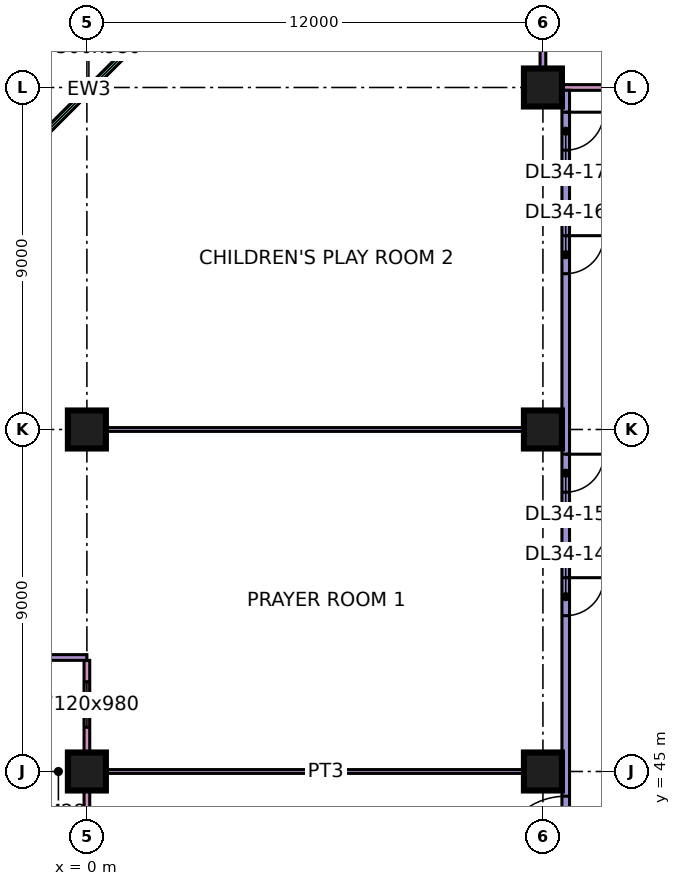
"""IFC4 building model, lengths in metres.
Left out: names, types, materials, properties, quantities, classifications, styles, units other than length and angle.
Written with IfcOpenShell. Run it as: python <this file> out.ifc"""

import sys

from ifc_helpers import new_model, si_unit, direction, frame, frame_2d, origin, origin_2d, place, context, subcontext, project, spatial, rectangle, extrude, element, fill, save


model = new_model("IFC4")
c1 = context("Model", 3, precision=1e-05, world=origin(), true_north=direction((0.0, 1.0)))
c2 = subcontext(c1, "Body", "Model", "MODEL_VIEW")
j1 = project(units=[si_unit("LENGTHUNIT", "METRE"), si_unit("PLANEANGLEUNIT", "RADIAN")], contexts=[c1])
p1 = place(None, origin())
s1 = spatial("IfcSite", under=j1, at=p1, CompositionType="ELEMENT")
p2 = place(p1, origin())
s2 = spatial("IfcBuilding", under=s1, at=p2, CompositionType="ELEMENT")
p3 = place(p2, frame((0.0, 0.0, 146.15)))
s3 = spatial("IfcBuildingStorey", under=s2, at=p3, CompositionType="ELEMENT", Elevation=146.15)
p4 = place(p3, frame((0.0, 45.0, 0.0), z_axis=(0.0, 0.0, 1.0), x_axis=(1.0, 0.0, 0.0)))
e1 = element("IfcColumn", 1, at=p4, inside=s3, PredefinedType="COLUMN", context=c2, shape_type="SweptSolid", body=[
    extrude(rectangle(XDim=1.0, YDim=1.0, at=origin_2d()), origin(), (0.0, 0.0, 1.0), 11.25),
])
p5 = place(p3, frame((0.0, 54.0, 0.0), z_axis=(0.0, 0.0, 1.0), x_axis=(1.0, 0.0, 0.0)))
e2 = element("IfcColumn", 2, at=p5, inside=s3, PredefinedType="COLUMN", context=c2, shape_type="SweptSolid", body=[
    extrude(rectangle(XDim=1.0, YDim=1.0, at=origin_2d()), origin(), (0.0, 0.0, 1.0), 11.25),
])
for number, where, z_axis, x_axis in (
    (3, (12.0, 45.0, 0.0), (0.0, 0.0, 1.0), (1.0, 0.0, 0.0)),
    (4, (12.0, 54.0, 0.0), (0.0, 0.0, 1.0), (1.0, 0.0, 0.0)),
    (5, (12.0, 63.0, 0.0), (0.0, 0.0, 1.0), (1.0, 0.0, 0.0)),
):
    element("IfcColumn", number, at=place(p3, frame(where, z_axis=z_axis, x_axis=x_axis)), inside=s3, PredefinedType="COLUMN", context=c2, shape_type="SweptSolid", body=[
        extrude(rectangle(XDim=1.0, YDim=1.0, at=origin_2d()), origin(), (0.0, 0.0, 1.0), 11.25),
    ])
p6 = place(p3, frame((22.425, 63.0, 0.0), z_axis=(0.0, 0.0, 1.0), x_axis=(-1.0, 0.0, 0.0)))
e6 = element("IfcWall", 6, at=p6, inside=s3, PredefinedType="SOLIDWALL", context=c2, shape_type="SweptSolid", body=[
    extrude(rectangle(XDim=10.35, YDim=0.15, at=frame_2d((5.175, 0.0))), origin(), (0.0, 0.0, 1.0), 10.85),
])
p7 = place(p6, frame((1.913, 0.0, 0.45)))
e7 = element("IfcOpeningElement", 7, at=p7, cuts=e6, PredefinedType="OPENING", context=c2, shape_type="SweptSolid", body=[
    extrude(rectangle(XDim=3.0, YDim=9.8, at=frame_2d((1.5, 4.9))), frame((0.0, 0.085, 0.0), z_axis=(0.0, -1.0, 0.0), x_axis=(1.0, 0.0, 0.0)), (0.0, 0.0, 1.0), 0.17),
])
p8 = place(p3, frame((12.0, 64.5, 0.0), z_axis=(0.0, 0.0, 1.0), x_axis=(0.0, -1.0, 0.0)))
e8 = element("IfcWall", 8, at=p8, inside=s3, PredefinedType="SOLIDWALL", context=c2, shape_type="SweptSolid", body=[
    extrude(rectangle(XDim=1.5, YDim=0.15, at=frame_2d((0.75, 0.0))), origin(), (0.0, 0.0, 1.0), 10.85),
])
p9 = place(p3, frame((1.553, 64.447, 0.0), z_axis=(0.0, 0.0, 1.0), x_axis=(-0.707106781187, -0.707106781187, 0.0)))
e9 = element("IfcWall", 9, at=p9, inside=s3, PredefinedType="SOLIDWALL", context=c2, shape_type="SweptSolid", body=[
    extrude(rectangle(XDim=4.243, YDim=0.15, at=frame_2d((2.121, 0.0))), origin(), (0.0, 0.0, 1.0), 10.85),
])
p10 = place(p9, frame((0.621, 0.0, 0.45)))
e10 = element("IfcOpeningElement", 10, at=p10, cuts=e9, PredefinedType="OPENING", context=c2, shape_type="SweptSolid", body=[
    extrude(rectangle(XDim=3.0, YDim=9.8, at=frame_2d((1.5, 4.9))), frame((0.0, 0.085, 0.0), z_axis=(0.0, -1.0, 0.0), x_axis=(1.0, 0.0, 0.0)), (0.0, 0.0, 1.0), 0.17),
])
p11 = place(p3, frame((0.0, 47.925, 0.0), z_axis=(0.0, 0.0, 1.0), x_axis=(0.0, -1.0, 0.0)))
e11 = element("IfcWall", 11, at=p11, inside=s3, PredefinedType="SOLIDWALL", context=c2, shape_type="SweptSolid", body=[
    extrude(rectangle(XDim=11.85, YDim=0.15, at=frame_2d((5.925, 0.0))), origin(), (0.0, 0.0, 1.0), 10.85),
])
p12 = place(p11, frame((0.562, 0.0, 0.45)))
e12 = element("IfcOpeningElement", 12, at=p12, cuts=e11, PredefinedType="OPENING", context=c2, shape_type="SweptSolid", body=[
    extrude(rectangle(XDim=1.2, YDim=9.8, at=frame_2d((0.6, 4.9))), frame((0.0, 0.085, 0.0), z_axis=(0.0, -1.0, 0.0), x_axis=(1.0, 0.0, 0.0)), (0.0, 0.0, 1.0), 0.17),
])
p13 = place(p11, frame((5.925, 0.0, 0.45)))
e13 = element("IfcOpeningElement", 13, at=p13, cuts=e11, PredefinedType="OPENING", context=c2, shape_type="SweptSolid", body=[
    extrude(rectangle(XDim=3.0, YDim=9.8, at=frame_2d((1.5, 4.9))), frame((0.0, 0.085, 0.0), z_axis=(0.0, -1.0, 0.0), x_axis=(1.0, 0.0, 0.0)), (0.0, 0.0, 1.0), 0.17),
])
p14 = place(p3, frame((-1.5, 48.0, 0.0), z_axis=(0.0, 0.0, 1.0), x_axis=(1.0, 0.0, 0.0)))
e14 = element("IfcWall", 14, at=p14, inside=s3, PredefinedType="SOLIDWALL", context=c2, shape_type="SweptSolid", body=[
    extrude(rectangle(XDim=1.5, YDim=0.15, at=frame_2d((0.75, 0.0))), origin(), (0.0, 0.0, 1.0), 10.85),
])
e15 = element("IfcWall", 15, at=p5, inside=s3, PredefinedType="PARTITIONING", context=c2, shape_type="SweptSolid", body=[
    extrude(rectangle(XDim=12.5, YDim=0.1, at=frame_2d((6.25, 0.0))), origin(), (0.0, 0.0, 1.0), 10.85),
])
p15 = place(p3, frame((0.074, 45.0, 0.0), z_axis=(0.0, 0.0, 1.0), x_axis=(1.0, 0.0, 0.0)))
e16 = element("IfcWall", 16, at=p15, inside=s3, PredefinedType="PARTITIONING", context=c2, shape_type="SweptSolid", body=[
    extrude(rectangle(XDim=12.426, YDim=0.1, at=frame_2d((6.213, 0.0))), origin(), (0.0, 0.0, 1.0), 10.85),
])
p16 = place(p3, frame((12.6, 22.9, 0.0), z_axis=(0.0, 0.0, 1.0), x_axis=(0.0, 1.0, 0.0)))
e17 = element("IfcWall", 17, at=p16, inside=s3, PredefinedType="PARTITIONING", context=c2, shape_type="SweptSolid", body=[
    extrude(rectangle(XDim=40.026, YDim=0.2, at=frame_2d((20.013, 0.0))), origin(), (0.0, 0.0, 1.0), 10.85),
])
p17 = place(p16, frame((13.65, 0.0, 0.0)))
e18 = element("IfcOpeningElement", 18, at=p17, cuts=e17, PredefinedType="OPENING", context=c2, shape_type="SweptSolid", body=[
    extrude(rectangle(XDim=1.8, YDim=2.1, at=frame_2d((0.9, 1.05))), frame((0.0, 0.11, 0.0), z_axis=(0.0, -1.0, 0.0), x_axis=(1.0, 0.0, 0.0)), (0.0, 0.0, 1.0), 0.22),
])
p18 = place(p16, frame((19.65, 0.0, 0.0)))
e19 = element("IfcOpeningElement", 19, at=p18, cuts=e17, PredefinedType="OPENING", context=c2, shape_type="SweptSolid", body=[
    extrude(rectangle(XDim=1.8, YDim=2.1, at=frame_2d((0.9, 1.05))), frame((0.0, 0.11, 0.0), z_axis=(0.0, -1.0, 0.0), x_axis=(1.0, 0.0, 0.0)), (0.0, 0.0, 1.0), 0.22),
])
p19 = place(p16, frame((26.2, 0.0, 0.0)))
e20 = element("IfcOpeningElement", 20, at=p19, cuts=e17, PredefinedType="OPENING", context=c2, shape_type="SweptSolid", body=[
    extrude(rectangle(XDim=1.0, YDim=2.1, at=frame_2d((0.5, 1.05))), frame((0.0, 0.11, 0.0), z_axis=(0.0, -1.0, 0.0), x_axis=(1.0, 0.0, 0.0)), (0.0, 0.0, 1.0), 0.22),
])
p20 = place(p16, frame((29.45, 0.0, 0.0)))
e21 = element("IfcOpeningElement", 21, at=p20, cuts=e17, PredefinedType="OPENING", context=c2, shape_type="SweptSolid", body=[
    extrude(rectangle(XDim=1.0, YDim=2.1, at=frame_2d((0.5, 1.05))), frame((0.0, 0.11, 0.0), z_axis=(0.0, -1.0, 0.0), x_axis=(1.0, 0.0, 0.0)), (0.0, 0.0, 1.0), 0.22),
])
p21 = place(p16, frame((35.2, 0.0, 0.0)))
e22 = element("IfcOpeningElement", 22, at=p21, cuts=e17, PredefinedType="OPENING", context=c2, shape_type="SweptSolid", body=[
    extrude(rectangle(XDim=1.0, YDim=2.1, at=frame_2d((0.5, 1.05))), frame((0.0, 0.11, 0.0), z_axis=(0.0, -1.0, 0.0), x_axis=(1.0, 0.0, 0.0)), (0.0, 0.0, 1.0), 0.22),
])
p22 = place(p16, frame((38.45, 0.0, 0.0)))
e23 = element("IfcOpeningElement", 23, at=p22, cuts=e17, PredefinedType="OPENING", context=c2, shape_type="SweptSolid", body=[
    extrude(rectangle(XDim=1.0, YDim=2.1, at=frame_2d((0.5, 1.05))), frame((0.0, 0.11, 0.0), z_axis=(0.0, -1.0, 0.0), x_axis=(1.0, 0.0, 0.0)), (0.0, 0.0, 1.0), 0.22),
])
p23 = place(p10, origin())
e24 = element("IfcWindow", 24, at=p23, inside=s3, PartitioningType="SINGLE_PANEL", PredefinedType="WINDOW", context=c2, shape_type="SweptSolid", body=[
    extrude(rectangle(XDim=3.0, YDim=9.8, at=frame_2d((1.5, 4.9))), frame((0.0, 0.03, 0.0), z_axis=(0.0, -1.0, 0.0), x_axis=(1.0, 0.0, 0.0)), (0.0, 0.0, 1.0), 0.06),
])
fill(e10, e24)
p24 = place(p12, origin())
e25 = element("IfcWindow", 25, at=p24, inside=s3, PartitioningType="SINGLE_PANEL", PredefinedType="WINDOW", context=c2, shape_type="SweptSolid", body=[
    extrude(rectangle(XDim=1.2, YDim=9.8, at=frame_2d((0.6, 4.9))), frame((0.0, 0.03, 0.0), z_axis=(0.0, -1.0, 0.0), x_axis=(1.0, 0.0, 0.0)), (0.0, 0.0, 1.0), 0.06),
])
fill(e12, e25)
p25 = place(p18, origin())
e26 = element("IfcDoor", 26, at=p25, inside=s3, OperationType="DOUBLE_DOOR_SINGLE_SWING", PredefinedType="DOOR", context=c2, shape_type="SweptSolid", body=[
    extrude(rectangle(XDim=1.8, YDim=2.1, at=frame_2d((0.9, 1.05))), frame((0.0, 0.025, 0.0), z_axis=(0.0, -1.0, 0.0), x_axis=(1.0, 0.0, 0.0)), (0.0, 0.0, 1.0), 0.05),
])
fill(e19, e26)
p26 = place(p19, origin())
e27 = element("IfcDoor", 27, at=p26, inside=s3, OperationType="SINGLE_SWING_RIGHT", PredefinedType="DOOR", context=c2, shape_type="SweptSolid", body=[
    extrude(rectangle(XDim=1.0, YDim=2.1, at=frame_2d((0.5, 1.05))), frame((0.0, 0.025, 0.0), z_axis=(0.0, -1.0, 0.0), x_axis=(1.0, 0.0, 0.0)), (0.0, 0.0, 1.0), 0.05),
])
fill(e20, e27)
p27 = place(p20, origin())
e28 = element("IfcDoor", 28, at=p27, inside=s3, OperationType="SINGLE_SWING_RIGHT", PredefinedType="DOOR", context=c2, shape_type="SweptSolid", body=[
    extrude(rectangle(XDim=1.0, YDim=2.1, at=frame_2d((0.5, 1.05))), frame((0.0, 0.025, 0.0), z_axis=(0.0, -1.0, 0.0), x_axis=(1.0, 0.0, 0.0)), (0.0, 0.0, 1.0), 0.05),
])
fill(e21, e28)
p28 = place(p21, origin())
e29 = element("IfcDoor", 29, at=p28, inside=s3, OperationType="SINGLE_SWING_RIGHT", PredefinedType="DOOR", context=c2, shape_type="SweptSolid", body=[
    extrude(rectangle(XDim=1.0, YDim=2.1, at=frame_2d((0.5, 1.05))), frame((0.0, 0.025, 0.0), z_axis=(0.0, -1.0, 0.0), x_axis=(1.0, 0.0, 0.0)), (0.0, 0.0, 1.0), 0.05),
])
fill(e22, e29)
p29 = place(p22, origin())
e30 = element("IfcDoor", 30, at=p29, inside=s3, OperationType="SINGLE_SWING_RIGHT", PredefinedType="DOOR", context=c2, shape_type="SweptSolid", body=[
    extrude(rectangle(XDim=1.0, YDim=2.1, at=frame_2d((0.5, 1.05))), frame((0.0, 0.025, 0.0), z_axis=(0.0, -1.0, 0.0), x_axis=(1.0, 0.0, 0.0)), (0.0, 0.0, 1.0), 0.05),
])
fill(e23, e30)
save(model, sys.argv[1])
